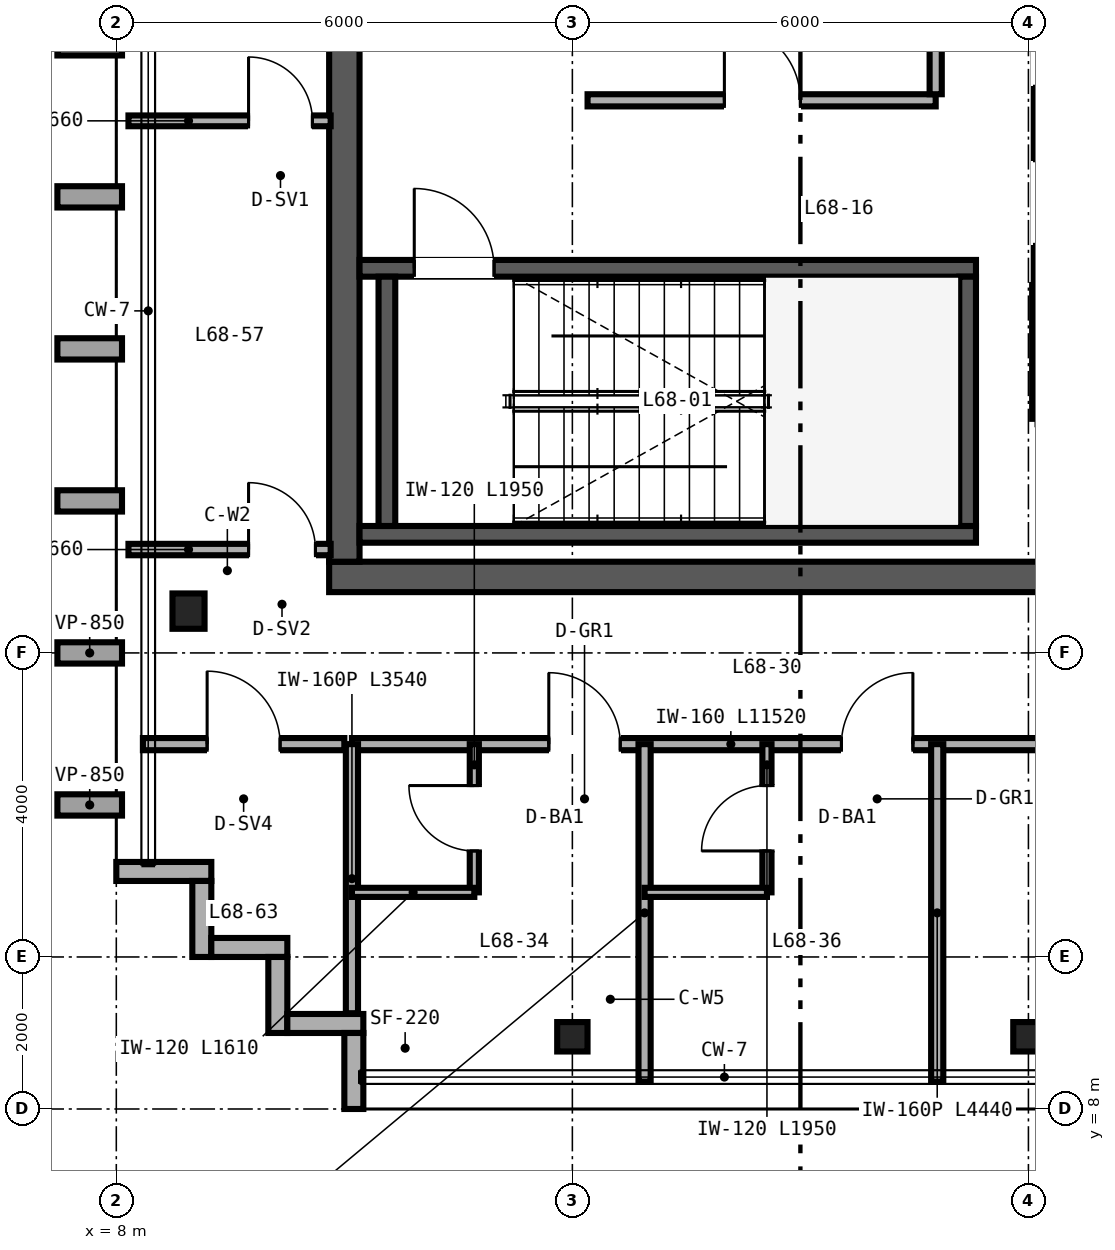
"""IFC4 building model, lengths in metres.
Left out: names, types, materials, properties, quantities, classifications, styles, units other than length and angle.
Written with IfcOpenShell. Run it as: python <this file> out.ifc"""

import sys

from ifc_helpers import new_model, si_unit, direction, frame, frame_2d, origin, origin_2d, place, context, subcontext, project, spatial, rectangle, i_section, extrude, source, transform, mapped, element, fill, save


model = new_model("IFC4")
c1 = context("Model", 3, precision=1e-05, world=origin(), true_north=direction((0.0, 1.0)))
c2 = subcontext(c1, "Body", "Model", "MODEL_VIEW")
j1 = project(units=[si_unit("LENGTHUNIT", "METRE"), si_unit("PLANEANGLEUNIT", "RADIAN")], contexts=[c1])
p1 = place(None, origin())
s1 = spatial("IfcSite", under=j1, at=p1, CompositionType="ELEMENT")
p2 = place(p1, origin())
s2 = spatial("IfcBuilding", under=s1, at=p2, CompositionType="ELEMENT")
p3 = place(p2, frame((0.0, 0.0, 268.8)))
s3 = spatial("IfcBuildingStorey", under=s2, at=p3, CompositionType="ELEMENT", Elevation=268.8)
p4 = place(p3, frame((10.8, 15.0, 0.0), z_axis=(0.0, 0.0, 1.0), x_axis=(1.0, 0.0, 0.0)))
e1 = element("IfcWall", 1, at=p4, inside=s3, PredefinedType="SHEAR", context=c2, shape_type="SweptSolid", body=[
    extrude(rectangle(XDim=12.4, YDim=0.4, at=frame_2d((6.2, 0.0))), origin(), (0.0, 0.0, 1.0), 3.28),
])
p5 = place(p4, frame((10.1, 0.0, 0.0)))
e2 = element("IfcOpeningElement", 2, at=p5, cuts=e1, PredefinedType="OPENING", context=c2, shape_type="SweptSolid", body=[
    extrude(rectangle(XDim=1.0, YDim=2.15, at=frame_2d((0.5, 1.075))), frame((0.0, 0.21, 0.0), z_axis=(0.0, -1.0, 0.0), x_axis=(1.0, 0.0, 0.0)), (0.0, 0.0, 1.0), 0.42),
])
p6 = place(p3, frame((11.0, 15.2, 0.0), z_axis=(0.0, 0.0, 1.0), x_axis=(0.0, 1.0, 0.0)))
e3 = element("IfcWall", 3, at=p6, inside=s3, PredefinedType="SHEAR", context=c2, shape_type="SweptSolid", body=[
    extrude(rectangle(XDim=21.6, YDim=0.4, at=frame_2d((10.8, 0.0))), origin(), (0.0, 0.0, 1.0), 3.28),
])
p7 = place(p3, frame((11.2, 15.56, 0.0), z_axis=(0.0, 0.0, 1.0), x_axis=(1.0, 0.0, 0.0)))
e4 = element("IfcWall", 4, at=p7, inside=s3, PredefinedType="SHEAR", context=c2, shape_type="SweptSolid", body=[
    extrude(rectangle(XDim=8.11, YDim=0.22, at=frame_2d((4.055, 0.0))), origin(), (0.0, 0.0, 1.0), 3.4),
])
p8 = place(p3, frame((11.2, 19.06, 0.0), z_axis=(0.0, 0.0, 1.0), x_axis=(1.0, 0.0, 0.0)))
e5 = element("IfcWall", 5, at=p8, inside=s3, PredefinedType="SHEAR", context=c2, shape_type="SweptSolid", body=[
    extrude(rectangle(XDim=8.11, YDim=0.22, at=frame_2d((4.055, 0.0))), origin(), (0.0, 0.0, 1.0), 3.4),
])
p9 = place(p8, frame((0.72, 0.0, 0.0)))
e6 = element("IfcOpeningElement", 6, at=p9, cuts=e5, PredefinedType="OPENING", context=c2, shape_type="SweptSolid", body=[
    extrude(rectangle(XDim=1.05, YDim=2.15, at=frame_2d((0.525, 1.075))), frame((0.0, 0.12, 0.0), z_axis=(0.0, -1.0, 0.0), x_axis=(1.0, 0.0, 0.0)), (0.0, 0.0, 1.0), 0.24),
])
for number, where, z_axis, x_axis in (
    (7, (11.56, 15.67, 0.0), (0.0, 0.0, 1.0), (0.0, 1.0, 0.0)),
    (8, (19.2, 15.67, 0.0), (0.0, 0.0, 1.0), (0.0, 1.0, 0.0)),
):
    element("IfcWall", number, at=place(p3, frame(where, z_axis=z_axis, x_axis=x_axis)), inside=s3, PredefinedType="SHEAR", context=c2, shape_type="SweptSolid", body=[
        extrude(rectangle(XDim=3.28, YDim=0.22, at=frame_2d((1.64, 0.0))), origin(), (0.0, 0.0, 1.0), 3.4),
    ])
m1 = source(origin(), c2, "Body", "SweptSolid", [
    extrude(i_section(OverallWidth=0.422, OverallDepth=0.465, WebThickness=0.045, FlangeThickness=0.073, FilletRadius=0.025, at=origin_2d()), origin(), (0.0, 0.0, 1.0), 3.28),
])
p10 = place(p3, frame((8.95, 14.55, 0.0), z_axis=(0.0, 0.0, 1.0), x_axis=(1.0, 0.0, 0.0)))
e9 = element("IfcColumn", 9, at=p10, inside=s3, PredefinedType="COLUMN", context=c2, shape_type="MappedRepresentation", body=[
    mapped(m1, transform((0.0, 0.0, 0.0), scale=1.0)),
])
m2 = source(origin(), c2, "Body", "SweptSolid", [
    extrude(i_section(OverallWidth=0.399, OverallDepth=0.387, WebThickness=0.021, FlangeThickness=0.033, FilletRadius=0.025, at=origin_2d()), origin(), (0.0, 0.0, 1.0), 3.28),
])
for number, where, z_axis, x_axis in (
    (10, (14.0, 8.95, 0.0), (0.0, 0.0, 1.0), (1.0, 0.0, 0.0)),
    (11, (20.0, 8.95, 0.0), (0.0, 0.0, 1.0), (1.0, 0.0, 0.0)),
):
    element("IfcColumn", number, at=place(p3, frame(where, z_axis=z_axis, x_axis=x_axis)), inside=s3, PredefinedType="COLUMN", context=c2, shape_type="MappedRepresentation", body=[
        mapped(m2, transform((0.0, 0.0, 0.0), scale=1.0)),
    ])
p11 = place(p3, frame((8.0, 11.125, 0.0), z_axis=(0.0, 0.0, 1.0), x_axis=(1.0, 0.0, 0.0)))
e12 = element("IfcWall", 12, at=p11, inside=s3, PredefinedType="SOLIDWALL", context=c2, shape_type="SweptSolid", body=[
    extrude(rectangle(XDim=1.25, YDim=0.25, at=frame_2d((0.625, 0.0))), origin(), (0.0, 0.0, 1.0), 3.28),
])
for number, where, z_axis, x_axis in (
    (13, (9.125, 11.0, 0.0), (0.0, 0.0, 1.0), (0.0, -1.0, 0.0)),
    (14, (9.25, 10.125, 0.0), (0.0, 0.0, 1.0), (1.0, 0.0, 0.0)),
    (15, (10.125, 10.0, 0.0), (0.0, 0.0, 1.0), (0.0, -1.0, 0.0)),
    (16, (10.25, 9.125, 0.0), (0.0, 0.0, 1.0), (1.0, 0.0, 0.0)),
    (17, (11.125, 9.0, 0.0), (0.0, 0.0, 1.0), (0.0, -1.0, 0.0)),
):
    element("IfcWall", number, at=place(p3, frame(where, z_axis=z_axis, x_axis=x_axis)), inside=s3, PredefinedType="SOLIDWALL", context=c2, shape_type="SweptSolid", body=[
        extrude(rectangle(XDim=1.0, YDim=0.25, at=frame_2d((0.5, 0.0))), origin(), (0.0, 0.0, 1.0), 3.28),
    ])
p12 = place(p3, frame((20.16, 18.82, 0.0), z_axis=(0.0, 0.0, 1.0), x_axis=(0.0, 1.0, 0.0)))
e18 = element("IfcWall", 18, at=p12, inside=s3, PredefinedType="SOLIDWALL", context=c2, shape_type="SweptSolid", body=[
    extrude(rectangle(XDim=6.32, YDim=0.18, at=frame_2d((3.16, 0.0))), origin(), (0.0, 0.0, 1.0), 2.38),
])
p13 = place(p12, frame((0.555, 0.0, 0.0)))
e19 = element("IfcOpeningElement", 19, at=p13, cuts=e18, PredefinedType="OPENING", context=c2, shape_type="SweptSolid", body=[
    extrude(rectangle(XDim=1.1, YDim=2.2, at=frame_2d((0.55, 1.1))), frame((0.0, 0.1, 0.0), z_axis=(0.0, -1.0, 0.0), x_axis=(1.0, 0.0, 0.0)), (0.0, 0.0, 1.0), 0.2),
])
p14 = place(p12, frame((2.635, 0.0, 0.0)))
e20 = element("IfcOpeningElement", 20, at=p14, cuts=e18, PredefinedType="OPENING", context=c2, shape_type="SweptSolid", body=[
    extrude(rectangle(XDim=1.1, YDim=2.2, at=frame_2d((0.55, 1.1))), frame((0.0, 0.1, 0.0), z_axis=(0.0, -1.0, 0.0), x_axis=(1.0, 0.0, 0.0)), (0.0, 0.0, 1.0), 0.2),
])
p15 = place(p12, frame((4.69, 0.0, 0.0)))
e21 = element("IfcOpeningElement", 21, at=p15, cuts=e18, PredefinedType="OPENING", context=c2, shape_type="SweptSolid", body=[
    extrude(rectangle(XDim=1.1, YDim=2.2, at=frame_2d((0.55, 1.1))), frame((0.0, 0.1, 0.0), z_axis=(0.0, -1.0, 0.0), x_axis=(1.0, 0.0, 0.0)), (0.0, 0.0, 1.0), 0.2),
])
p16 = place(p3, frame((14.2, 21.27, 0.0), z_axis=(0.0, 0.0, 1.0), x_axis=(1.0, 0.0, 0.0)))
e22 = element("IfcWall", 22, at=p16, inside=s3, PredefinedType="PARTITIONING", context=c2, shape_type="SweptSolid", body=[
    extrude(rectangle(XDim=4.58, YDim=0.16, at=frame_2d((2.29, 0.0))), origin(), (0.0, 0.0, 1.0), 3.28),
])
p17 = place(p16, frame((1.8, 0.0, 0.0)))
e23 = element("IfcOpeningElement", 23, at=p17, cuts=e22, PredefinedType="OPENING", context=c2, shape_type="SweptSolid", body=[
    extrude(rectangle(XDim=1.0, YDim=2.15, at=frame_2d((0.5, 1.075))), frame((0.0, 0.09, 0.0), z_axis=(0.0, -1.0, 0.0), x_axis=(1.0, 0.0, 0.0)), (0.0, 0.0, 1.0), 0.18),
])
p18 = place(p3, frame((18.78, 21.35, 0.0), z_axis=(0.0, 0.0, 1.0), x_axis=(0.0, 1.0, 0.0)))
e24 = element("IfcWall", 24, at=p18, inside=s3, PredefinedType="PARTITIONING", context=c2, shape_type="SweptSolid", body=[
    extrude(rectangle(XDim=3.81, YDim=0.16, at=frame_2d((1.905, 0.0))), origin(), (0.0, 0.0, 1.0), 3.28),
])
p19 = place(p3, frame((20.12, 17.08, 0.0), z_axis=(0.0, 0.0, 1.0), x_axis=(0.0, 1.0, 0.0)))
e25 = element("IfcWall", 25, at=p19, inside=s3, PredefinedType="PARTITIONING", context=c2, shape_type="SweptSolid", body=[
    extrude(rectangle(XDim=1.76, YDim=0.142, at=frame_2d((0.88, 0.0))), origin(), (0.0, 0.0, 1.0), 3.28),
])
p20 = place(p3, frame((11.1, 12.8, 0.0), z_axis=(0.0, 0.0, 1.0), x_axis=(1.0, 0.0, 0.0)))
e26 = element("IfcWall", 26, at=p20, inside=s3, PredefinedType="PARTITIONING", context=c2, shape_type="SweptSolid", body=[
    extrude(rectangle(XDim=11.52, YDim=0.16, at=frame_2d((5.76, 0.0))), origin(), (0.0, 0.0, 1.0), 3.28),
])
p21 = place(p20, frame((2.59, 0.0, 0.0)))
e27 = element("IfcOpeningElement", 27, at=p21, cuts=e26, PredefinedType="OPENING", context=c2, shape_type="SweptSolid", body=[
    extrude(rectangle(XDim=0.94, YDim=2.15, at=frame_2d((0.47, 1.075))), frame((0.0, 0.09, 0.0), z_axis=(0.0, -1.0, 0.0), x_axis=(1.0, 0.0, 0.0)), (0.0, 0.0, 1.0), 0.18),
])
p22 = place(p20, frame((6.44, 0.0, 0.0)))
e28 = element("IfcOpeningElement", 28, at=p22, cuts=e26, PredefinedType="OPENING", context=c2, shape_type="SweptSolid", body=[
    extrude(rectangle(XDim=0.94, YDim=2.15, at=frame_2d((0.47, 1.075))), frame((0.0, 0.09, 0.0), z_axis=(0.0, -1.0, 0.0), x_axis=(1.0, 0.0, 0.0)), (0.0, 0.0, 1.0), 0.18),
])
p23 = place(p20, frame((9.13, 0.0, 0.0)))
e29 = element("IfcOpeningElement", 29, at=p23, cuts=e26, PredefinedType="OPENING", context=c2, shape_type="SweptSolid", body=[
    extrude(rectangle(XDim=0.96, YDim=2.15, at=frame_2d((0.48, 1.075))), frame((0.0, 0.09, 0.0), z_axis=(0.0, -1.0, 0.0), x_axis=(1.0, 0.0, 0.0)), (0.0, 0.0, 1.0), 0.18),
])
p24 = place(p3, frame((11.1, 9.26, 0.0), z_axis=(0.0, 0.0, 1.0), x_axis=(0.0, 1.0, 0.0)))
e30 = element("IfcWall", 30, at=p24, inside=s3, PredefinedType="PARTITIONING", context=c2, shape_type="SweptSolid", body=[
    extrude(rectangle(XDim=3.54, YDim=0.16, at=frame_2d((1.77, 0.0))), origin(), (0.0, 0.0, 1.0), 3.28),
])
p25 = place(p3, frame((14.95, 8.36, 0.0), z_axis=(0.0, 0.0, 1.0), x_axis=(0.0, 1.0, 0.0)))
e31 = element("IfcWall", 31, at=p25, inside=s3, PredefinedType="PARTITIONING", context=c2, shape_type="SweptSolid", body=[
    extrude(rectangle(XDim=4.44, YDim=0.16, at=frame_2d((2.22, 0.0))), origin(), (0.0, 0.0, 1.0), 2.587),
])
p26 = place(p3, frame((12.71, 10.85, 0.0), z_axis=(0.0, 0.0, 1.0), x_axis=(0.0, 1.0, 0.0)))
e32 = element("IfcWall", 32, at=p26, inside=s3, PredefinedType="PARTITIONING", context=c2, shape_type="SweptSolid", body=[
    extrude(rectangle(XDim=1.95, YDim=0.12, at=frame_2d((0.975, 0.0))), origin(), (0.0, 0.0, 1.0), 3.28),
])
p27 = place(p26, frame((0.545, 0.0, 0.0)))
e33 = element("IfcOpeningElement", 33, at=p27, cuts=e32, PredefinedType="OPENING", context=c2, shape_type="SweptSolid", body=[
    extrude(rectangle(XDim=0.86, YDim=2.1, at=frame_2d((0.43, 1.05))), frame((0.0, 0.07, 0.0), z_axis=(0.0, -1.0, 0.0), x_axis=(1.0, 0.0, 0.0)), (0.0, 0.0, 1.0), 0.14),
])
p28 = place(p3, frame((11.1, 10.85, 0.0), z_axis=(0.0, 0.0, 1.0), x_axis=(1.0, 0.0, 0.0)))
e34 = element("IfcWall", 34, at=p28, inside=s3, PredefinedType="PARTITIONING", context=c2, shape_type="SweptSolid", body=[
    extrude(rectangle(XDim=1.61, YDim=0.12, at=frame_2d((0.805, 0.0))), origin(), (0.0, 0.0, 1.0), 3.28),
])
p29 = place(p3, frame((18.8, 8.36, 0.0), z_axis=(0.0, 0.0, 1.0), x_axis=(0.0, 1.0, 0.0)))
e35 = element("IfcWall", 35, at=p29, inside=s3, PredefinedType="PARTITIONING", context=c2, shape_type="SweptSolid", body=[
    extrude(rectangle(XDim=4.44, YDim=0.16, at=frame_2d((2.22, 0.0))), origin(), (0.0, 0.0, 1.0), 2.587),
])
p30 = place(p3, frame((16.56, 10.85, 0.0), z_axis=(0.0, 0.0, 1.0), x_axis=(0.0, 1.0, 0.0)))
e36 = element("IfcWall", 36, at=p30, inside=s3, PredefinedType="PARTITIONING", context=c2, shape_type="SweptSolid", body=[
    extrude(rectangle(XDim=1.95, YDim=0.12, at=frame_2d((0.975, 0.0))), origin(), (0.0, 0.0, 1.0), 3.28),
])
p31 = place(p30, frame((0.545, 0.0, 0.0)))
e37 = element("IfcOpeningElement", 37, at=p31, cuts=e36, PredefinedType="OPENING", context=c2, shape_type="SweptSolid", body=[
    extrude(rectangle(XDim=0.86, YDim=2.1, at=frame_2d((0.43, 1.05))), frame((0.0, 0.07, 0.0), z_axis=(0.0, -1.0, 0.0), x_axis=(1.0, 0.0, 0.0)), (0.0, 0.0, 1.0), 0.14),
])
p32 = place(p3, frame((14.95, 10.85, 0.0), z_axis=(0.0, 0.0, 1.0), x_axis=(1.0, 0.0, 0.0)))
e38 = element("IfcWall", 38, at=p32, inside=s3, PredefinedType="PARTITIONING", context=c2, shape_type="SweptSolid", body=[
    extrude(rectangle(XDim=1.61, YDim=0.12, at=frame_2d((0.805, 0.0))), origin(), (0.0, 0.0, 1.0), 3.28),
])
p33 = place(p3, frame((8.16, 15.36, 0.0), z_axis=(0.0, 0.0, 1.0), x_axis=(1.0, 0.0, 0.0)))
e39 = element("IfcWall", 39, at=p33, inside=s3, PredefinedType="PARTITIONING", context=c2, shape_type="SweptSolid", body=[
    extrude(rectangle(XDim=2.66, YDim=0.15, at=frame_2d((1.33, 0.0))), origin(), (0.0, 0.0, 1.0), 2.501),
])
p34 = place(p33, frame((1.58, 0.0, 0.0)))
e40 = element("IfcOpeningElement", 40, at=p34, cuts=e39, PredefinedType="OPENING", context=c2, shape_type="SweptSolid", body=[
    extrude(rectangle(XDim=0.88, YDim=2.15, at=frame_2d((0.44, 1.075))), frame((0.0, 0.085, 0.0), z_axis=(0.0, -1.0, 0.0), x_axis=(1.0, 0.0, 0.0)), (0.0, 0.0, 1.0), 0.17),
])
p35 = place(p3, frame((8.16, 21.0, 0.0), z_axis=(0.0, 0.0, 1.0), x_axis=(1.0, 0.0, 0.0)))
e41 = element("IfcWall", 41, at=p35, inside=s3, PredefinedType="PARTITIONING", context=c2, shape_type="SweptSolid", body=[
    extrude(rectangle(XDim=2.66, YDim=0.142, at=frame_2d((1.33, 0.0))), origin(), (0.0, 0.0, 1.0), 2.38),
])
p36 = place(p35, frame((1.58, 0.0, 0.0)))
e42 = element("IfcOpeningElement", 42, at=p36, cuts=e41, PredefinedType="OPENING", context=c2, shape_type="SweptSolid", body=[
    extrude(rectangle(XDim=0.84, YDim=2.1, at=frame_2d((0.42, 1.05))), frame((0.0, 0.081, 0.0), z_axis=(0.0, -1.0, 0.0), x_axis=(1.0, 0.0, 0.0)), (0.0, 0.0, 1.0), 0.162),
])
p37 = place(p3, frame((8.35, 12.8, 0.0), z_axis=(0.0, 0.0, 1.0), x_axis=(1.0, 0.0, 0.0)))
e43 = element("IfcWall", 43, at=p37, inside=s3, PredefinedType="PARTITIONING", context=c2, shape_type="SweptSolid", body=[
    extrude(rectangle(XDim=2.65, YDim=0.16, at=frame_2d((1.325, 0.0))), origin(), (0.0, 0.0, 1.0), 3.28),
])
p38 = place(p37, frame((0.845, 0.0, 0.0)))
e44 = element("IfcOpeningElement", 44, at=p38, cuts=e43, PredefinedType="OPENING", context=c2, shape_type="SweptSolid", body=[
    extrude(rectangle(XDim=0.96, YDim=2.15, at=frame_2d((0.48, 1.075))), frame((0.0, 0.09, 0.0), z_axis=(0.0, -1.0, 0.0), x_axis=(1.0, 0.0, 0.0)), (0.0, 0.0, 1.0), 0.18),
])
m3 = source(origin(), c2, "Body", "SweptSolid", [
    extrude(rectangle(XDim=1.05, YDim=2.15, at=frame_2d((0.525, 1.075))), frame((0.0, 0.025, 0.0), z_axis=(0.0, -1.0, 0.0), x_axis=(1.0, 0.0, 0.0)), (0.0, 0.0, 1.0), 0.05),
])
p39 = place(p9, origin())
e45 = element("IfcDoor", 45, at=p39, inside=s3, OperationType="SINGLE_SWING_LEFT", PredefinedType="DOOR", context=c2, shape_type="MappedRepresentation", body=[
    mapped(m3, transform((0.0, 0.0, 0.0), scale=1.0)),
])
fill(e6, e45)
m4 = source(origin(), c2, "Body", "SweptSolid", [
    extrude(rectangle(XDim=1.0, YDim=2.15, at=frame_2d((0.5, 1.075))), frame((0.0, 0.025, 0.0), z_axis=(0.0, -1.0, 0.0), x_axis=(1.0, 0.0, 0.0)), (0.0, 0.0, 1.0), 0.05),
])
p40 = place(p17, origin())
e46 = element("IfcDoor", 46, at=p40, inside=s3, OperationType="SINGLE_SWING_LEFT", PredefinedType="DOOR", context=c2, shape_type="MappedRepresentation", body=[
    mapped(m4, transform((0.0, 0.0, 0.0), scale=1.0)),
])
fill(e23, e46)
m5 = source(origin(), c2, "Body", "SweptSolid", [
    extrude(rectangle(XDim=0.86, YDim=2.1, at=frame_2d((0.43, 1.05))), frame((0.0, 0.025, 0.0), z_axis=(0.0, -1.0, 0.0), x_axis=(1.0, 0.0, 0.0)), (0.0, 0.0, 1.0), 0.05),
])
p41 = place(p27, origin())
e47 = element("IfcDoor", 47, at=p41, inside=s3, OperationType="SINGLE_SWING_RIGHT", PredefinedType="DOOR", context=c2, shape_type="MappedRepresentation", body=[
    mapped(m5, transform((0.0, 0.0, 0.0), scale=1.0)),
])
fill(e33, e47)
p42 = place(p31, origin())
e48 = element("IfcDoor", 48, at=p42, inside=s3, OperationType="SINGLE_SWING_LEFT", PredefinedType="DOOR", context=c2, shape_type="MappedRepresentation", body=[
    mapped(m5, transform((0.0, 0.0, 0.0), scale=1.0)),
])
fill(e37, e48)
m6 = source(origin(), c2, "Body", "SweptSolid", [
    extrude(rectangle(XDim=0.94, YDim=2.15, at=frame_2d((0.47, 1.075))), frame((0.0, 0.025, 0.0), z_axis=(0.0, -1.0, 0.0), x_axis=(1.0, 0.0, 0.0)), (0.0, 0.0, 1.0), 0.05),
])
p43 = place(p21, origin())
e49 = element("IfcDoor", 49, at=p43, inside=s3, OperationType="SINGLE_SWING_LEFT", PredefinedType="DOOR", context=c2, shape_type="MappedRepresentation", body=[
    mapped(m6, transform((0.0, 0.0, 0.0), scale=1.0)),
])
fill(e27, e49)
p44 = place(p22, origin())
e50 = element("IfcDoor", 50, at=p44, inside=s3, OperationType="SINGLE_SWING_RIGHT", PredefinedType="DOOR", context=c2, shape_type="MappedRepresentation", body=[
    mapped(m6, transform((0.0, 0.0, 0.0), scale=1.0)),
])
fill(e28, e50)
m7 = source(origin(), c2, "Body", "SweptSolid", [
    extrude(rectangle(XDim=0.88, YDim=2.15, at=frame_2d((0.44, 1.075))), frame((0.0, 0.025, 0.0), z_axis=(0.0, -1.0, 0.0), x_axis=(1.0, 0.0, 0.0)), (0.0, 0.0, 1.0), 0.05),
])
p45 = place(p34, origin())
e51 = element("IfcDoor", 51, at=p45, inside=s3, OperationType="SINGLE_SWING_LEFT", PredefinedType="DOOR", context=c2, shape_type="MappedRepresentation", body=[
    mapped(m7, transform((0.0, 0.0, 0.0), scale=1.0)),
])
fill(e40, e51)
m8 = source(origin(), c2, "Body", "SweptSolid", [
    extrude(rectangle(XDim=0.84, YDim=2.1, at=frame_2d((0.42, 1.05))), frame((0.0, 0.025, 0.0), z_axis=(0.0, -1.0, 0.0), x_axis=(1.0, 0.0, 0.0)), (0.0, 0.0, 1.0), 0.05),
])
p46 = place(p36, origin())
e52 = element("IfcDoor", 52, at=p46, inside=s3, OperationType="SINGLE_SWING_LEFT", PredefinedType="DOOR", context=c2, shape_type="MappedRepresentation", body=[
    mapped(m8, transform((0.0, 0.0, 0.0), scale=1.0)),
])
fill(e42, e52)
m9 = source(origin(), c2, "Body", "SweptSolid", [
    extrude(rectangle(XDim=0.96, YDim=2.15, at=frame_2d((0.48, 1.075))), frame((0.0, 0.025, 0.0), z_axis=(0.0, -1.0, 0.0), x_axis=(1.0, 0.0, 0.0)), (0.0, 0.0, 1.0), 0.05),
])
p47 = place(p38, origin())
e53 = element("IfcDoor", 53, at=p47, inside=s3, OperationType="SINGLE_SWING_LEFT", PredefinedType="DOOR", context=c2, shape_type="MappedRepresentation", body=[
    mapped(m9, transform((0.0, 0.0, 0.0), scale=1.0)),
])
fill(e44, e53)
save(model, sys.argv[1])
